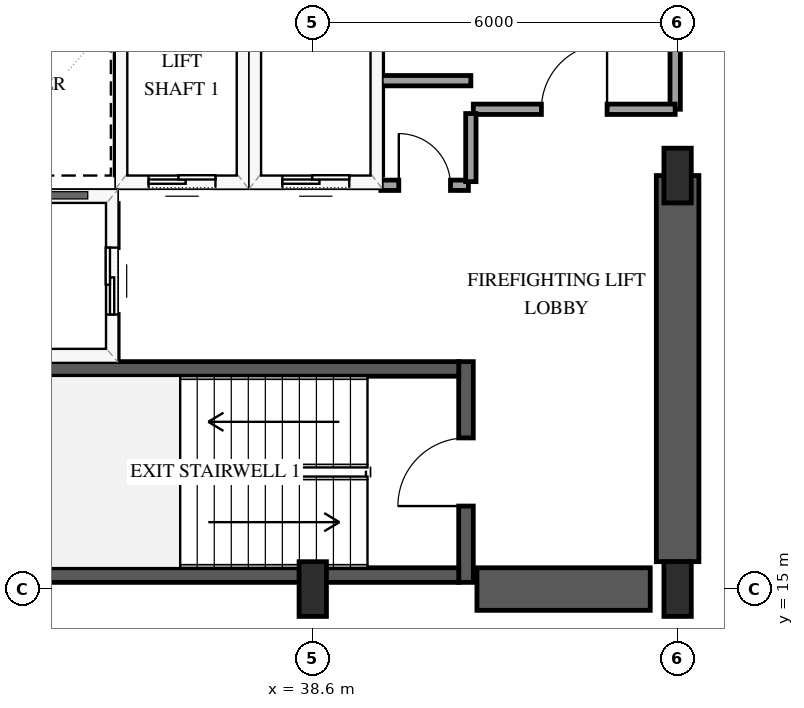
"""IFC4 building model, lengths in metres.
Left out: names, types, materials, properties, quantities, classifications, styles, units other than length and angle.
Written with IfcOpenShell. Run it as: python <this file> out.ifc"""

import sys

from ifc_helpers import new_model, si_unit, direction, frame, frame_2d, origin, origin_2d, place, context, subcontext, project, spatial, rectangle, extrude, element, fill, save


model = new_model("IFC4")
c1 = context("Model", 3, precision=1e-05, world=origin(), true_north=direction((0.0, 1.0)))
c2 = subcontext(c1, "Body", "Model", "MODEL_VIEW")
j1 = project(units=[si_unit("LENGTHUNIT", "METRE"), si_unit("PLANEANGLEUNIT", "RADIAN")], contexts=[c1])
p1 = place(None, origin())
s1 = spatial("IfcSite", under=j1, at=p1, CompositionType="ELEMENT")
p2 = place(p1, origin())
s2 = spatial("IfcBuilding", under=s1, at=p2, CompositionType="ELEMENT")
p3 = place(p2, frame((0.0, 0.0, 70.6)))
s3 = spatial("IfcBuildingStorey", under=s2, at=p3, CompositionType="ELEMENT", Elevation=70.6)
p4 = place(p3, frame((41.12, 15.11, 0.0), z_axis=(0.0, 0.0, 1.0), x_axis=(0.0, 1.0, 0.0)))
e1 = element("IfcWall", 1, at=p4, inside=s3, PredefinedType="SHEAR", context=c2, shape_type="SweptSolid", body=[
    extrude(rectangle(XDim=3.63, YDim=0.24, at=frame_2d((1.815, 0.0))), origin(), (0.0, 0.0, 1.0), 4.0),
])
p5 = place(p4, frame((1.255, 0.0, 0.0)))
e2 = element("IfcOpeningElement", 2, at=p5, cuts=e1, PredefinedType="OPENING", context=c2, shape_type="SweptSolid", body=[
    extrude(rectangle(XDim=1.12, YDim=2.15, at=frame_2d((0.56, 1.075))), frame((0.0, 0.13, 0.0), z_axis=(0.0, -1.0, 0.0), x_axis=(1.0, 0.0, 0.0)), (0.0, 0.0, 1.0), 0.26),
])
for number, where, z_axis, x_axis in (
    (3, (33.0, 15.23, 0.0), (0.0, 0.0, 1.0), (1.0, 0.0, 0.0)),
    (4, (33.0, 18.62, 0.0), (0.0, 0.0, 1.0), (1.0, 0.0, 0.0)),
):
    element("IfcWall", number, at=place(p3, frame(where, z_axis=z_axis, x_axis=x_axis)), inside=s3, PredefinedType="SHEAR", context=c2, shape_type="SweptSolid", body=[
        extrude(rectangle(XDim=8.0, YDim=0.24, at=frame_2d((4.0, 0.0))), origin(), (0.0, 0.0, 1.0), 4.0),
    ])
p6 = place(p3, frame((41.3, 15.0, 0.0), z_axis=(0.0, 0.0, 1.0), x_axis=(1.0, 0.0, 0.0)))
e5 = element("IfcWall", 5, at=p6, inside=s3, PredefinedType="SHEAR", context=c2, shape_type="SweptSolid", body=[
    extrude(rectangle(XDim=2.85, YDim=0.7, at=frame_2d((1.425, 0.0))), origin(), (0.0, 0.0, 1.0), 4.0),
])
p7 = place(p3, frame((44.6, 15.45, 0.0), z_axis=(0.0, 0.0, 1.0), x_axis=(0.0, 1.0, 0.0)))
e6 = element("IfcWall", 6, at=p7, inside=s3, PredefinedType="SHEAR", context=c2, shape_type="SweptSolid", body=[
    extrude(rectangle(XDim=6.35, YDim=0.7, at=frame_2d((3.175, 0.0))), origin(), (0.0, 0.0, 1.0), 4.0),
])
for number, where, z_axis, x_axis in (
    (7, (38.6, 15.0, 0.0), (0.0, 0.0, 1.0), (1.0, 0.0, 0.0)),
    (8, (44.6, 15.0, 0.0), (0.0, 0.0, 1.0), (1.0, 0.0, 0.0)),
    (9, (44.6, 21.8, 0.0), (0.0, 0.0, 1.0), (1.0, 0.0, 0.0)),
):
    element("IfcColumn", number, at=place(p3, frame(where, z_axis=z_axis, x_axis=x_axis)), inside=s3, PredefinedType="PILASTER", context=c2, shape_type="SweptSolid", body=[
        extrude(rectangle(XDim=0.45, YDim=0.9, at=origin_2d()), origin(), (0.0, 0.0, 1.0), 4.0),
    ])
p8 = place(p3, frame((35.45, 21.7, 0.0), z_axis=(0.0, 0.0, 1.0), x_axis=(1.0, 0.0, 0.0)))
e10 = element("IfcWall", 10, at=p8, inside=s3, PredefinedType="SOLIDWALL", context=c2, shape_type="SweptSolid", body=[
    extrude(rectangle(XDim=2.0, YDim=0.2, at=frame_2d((1.0, 0.0))), origin(), (0.0, 0.0, 1.0), 3.7),
])
p9 = place(p8, frame((0.45, 0.0, 0.0)))
e11 = element("IfcOpeningElement", 11, at=p9, cuts=e10, PredefinedType="OPENING", context=c2, shape_type="SweptSolid", body=[
    extrude(rectangle(XDim=1.1, YDim=2.15, at=frame_2d((0.55, 1.075))), frame((0.0, 0.11, 0.0), z_axis=(0.0, -1.0, 0.0), x_axis=(1.0, 0.0, 0.0)), (0.0, 0.0, 1.0), 0.22),
])
for number, where, z_axis, x_axis in (
    (12, (35.45, 21.81, 0.0), (0.0, 0.0, 1.0), (0.0, 1.0, 0.0)),
    (13, (37.45, 21.81, 0.0), (0.0, 0.0, 1.0), (0.0, 1.0, 0.0)),
):
    element("IfcWall", number, at=place(p3, frame(where, z_axis=z_axis, x_axis=x_axis)), inside=s3, PredefinedType="SOLIDWALL", context=c2, shape_type="SweptSolid", body=[
        extrude(rectangle(XDim=2.38, YDim=0.2, at=frame_2d((1.19, 0.0))), origin(), (0.0, 0.0, 1.0), 3.7),
    ])
p10 = place(p3, frame((37.65, 21.7, 0.0), z_axis=(0.0, 0.0, 1.0), x_axis=(1.0, 0.0, 0.0)))
e14 = element("IfcWall", 14, at=p10, inside=s3, PredefinedType="SOLIDWALL", context=c2, shape_type="SweptSolid", body=[
    extrude(rectangle(XDim=2.0, YDim=0.2, at=frame_2d((1.0, 0.0))), origin(), (0.0, 0.0, 1.0), 3.7),
])
p11 = place(p10, frame((0.45, 0.0, 0.0)))
e15 = element("IfcOpeningElement", 15, at=p11, cuts=e14, PredefinedType="OPENING", context=c2, shape_type="SweptSolid", body=[
    extrude(rectangle(XDim=1.1, YDim=2.15, at=frame_2d((0.55, 1.075))), frame((0.0, 0.11, 0.0), z_axis=(0.0, -1.0, 0.0), x_axis=(1.0, 0.0, 0.0)), (0.0, 0.0, 1.0), 0.22),
])
p12 = place(p3, frame((39.65, 21.81, 0.0), z_axis=(0.0, 0.0, 1.0), x_axis=(0.0, 1.0, 0.0)))
e16 = element("IfcWall", 16, at=p12, inside=s3, PredefinedType="SOLIDWALL", context=c2, shape_type="SweptSolid", body=[
    extrude(rectangle(XDim=2.38, YDim=0.2, at=frame_2d((1.19, 0.0))), origin(), (0.0, 0.0, 1.0), 3.7),
])
p13 = place(p3, frame((32.72, 21.45, 0.0), z_axis=(0.0, 0.0, 1.0), x_axis=(1.0, 0.0, 0.0)))
e17 = element("IfcWall", 17, at=p13, inside=s3, PredefinedType="SOLIDWALL", context=c2, shape_type="SweptSolid", body=[
    extrude(rectangle(XDim=2.58, YDim=0.2, at=frame_2d((1.29, 0.0))), origin(), (0.0, 0.0, 1.0), 3.7),
])
p14 = place(p3, frame((35.3, 18.79, 0.0), z_axis=(0.0, 0.0, 1.0), x_axis=(0.0, 1.0, 0.0)))
e18 = element("IfcWall", 18, at=p14, inside=s3, PredefinedType="SOLIDWALL", context=c2, shape_type="SweptSolid", body=[
    extrude(rectangle(XDim=2.55, YDim=0.2, at=frame_2d((1.275, 0.0))), origin(), (0.0, 0.0, 1.0), 3.7),
])
p15 = place(p14, frame((0.725, 0.0, 0.0)))
e19 = element("IfcOpeningElement", 19, at=p15, cuts=e18, PredefinedType="OPENING", context=c2, shape_type="SweptSolid", body=[
    extrude(rectangle(XDim=1.1, YDim=2.15, at=frame_2d((0.55, 1.075))), frame((0.0, 0.11, 0.0), z_axis=(0.0, -1.0, 0.0), x_axis=(1.0, 0.0, 0.0)), (0.0, 0.0, 1.0), 0.22),
])
p16 = place(p3, frame((44.56, 29.8, 0.0), z_axis=(0.0, 0.0, 1.0), x_axis=(0.0, -1.0, 0.0)))
e20 = element("IfcWall", 20, at=p16, inside=s3, PredefinedType="PARTITIONING", context=c2, shape_type="SweptSolid", body=[
    extrude(rectangle(XDim=6.91, YDim=0.17, at=frame_2d((3.455, 0.0))), origin(), (0.0, 0.0, 1.0), 2.74),
])
p17 = place(p16, frame((2.915, 0.0, 0.0)))
e21 = element("IfcOpeningElement", 21, at=p17, cuts=e20, PredefinedType="OPENING", context=c2, shape_type="SweptSolid", body=[
    extrude(rectangle(XDim=1.08, YDim=2.15, at=frame_2d((0.54, 1.075))), frame((0.0, 0.095, 0.0), z_axis=(0.0, -1.0, 0.0), x_axis=(1.0, 0.0, 0.0)), (0.0, 0.0, 1.0), 0.19),
])
p18 = place(p3, frame((41.24, 22.89, 0.0), z_axis=(0.0, 0.0, 1.0), x_axis=(1.0, 0.0, 0.0)))
e22 = element("IfcWall", 22, at=p18, inside=s3, PredefinedType="PARTITIONING", context=c2, shape_type="SweptSolid", body=[
    extrude(rectangle(XDim=3.32, YDim=0.17, at=frame_2d((1.66, 0.0))), origin(), (0.0, 0.0, 1.0), 3.7),
])
p19 = place(p18, frame((1.12, 0.0, 0.0)))
e23 = element("IfcOpeningElement", 23, at=p19, cuts=e22, PredefinedType="OPENING", context=c2, shape_type="SweptSolid", body=[
    extrude(rectangle(XDim=1.08, YDim=2.15, at=frame_2d((0.54, 1.075))), frame((0.0, 0.095, 0.0), z_axis=(0.0, -1.0, 0.0), x_axis=(1.0, 0.0, 0.0)), (0.0, 0.0, 1.0), 0.19),
])
p20 = place(p3, frame((39.72, 21.64, 0.0), z_axis=(0.0, 0.0, 1.0), x_axis=(1.0, 0.0, 0.0)))
e24 = element("IfcWall", 24, at=p20, inside=s3, PredefinedType="PARTITIONING", context=c2, shape_type="SweptSolid", body=[
    extrude(rectangle(XDim=1.44, YDim=0.17, at=frame_2d((0.72, 0.0))), origin(), (0.0, 0.0, 1.0), 3.7),
])
p21 = place(p20, frame((0.295, 0.0, 0.0)))
e25 = element("IfcOpeningElement", 25, at=p21, cuts=e24, PredefinedType="OPENING", context=c2, shape_type="SweptSolid", body=[
    extrude(rectangle(XDim=0.85, YDim=2.1, at=frame_2d((0.425, 1.05))), frame((0.0, 0.095, 0.0), z_axis=(0.0, -1.0, 0.0), x_axis=(1.0, 0.0, 0.0)), (0.0, 0.0, 1.0), 0.19),
])
p22 = place(p3, frame((41.2, 21.7, 0.0), z_axis=(0.0, 0.0, 1.0), x_axis=(0.0, 1.0, 0.0)))
e26 = element("IfcWall", 26, at=p22, inside=s3, PredefinedType="PARTITIONING", context=c2, shape_type="SweptSolid", body=[
    extrude(rectangle(XDim=1.12, YDim=0.17, at=frame_2d((0.56, 0.0))), origin(), (0.0, 0.0, 1.0), 3.7),
])
p23 = place(p3, frame((41.2, 23.36, 0.0), z_axis=(0.0, 0.0, 1.0), x_axis=(-1.0, 0.0, 0.0)))
e27 = element("IfcWall", 27, at=p23, inside=s3, PredefinedType="PARTITIONING", context=c2, shape_type="SweptSolid", body=[
    extrude(rectangle(XDim=1.48, YDim=0.17, at=frame_2d((0.74, 0.0))), origin(), (0.0, 0.0, 1.0), 3.7),
])
p24 = place(p9, origin())
e28 = element("IfcDoor", 28, at=p24, inside=s3, OperationType="SLIDING_TO_LEFT", PredefinedType="DOOR", context=c2, shape_type="SweptSolid", body=[
    extrude(rectangle(XDim=1.1, YDim=2.15, at=frame_2d((0.55, 1.075))), frame((0.0, 0.025, 0.0), z_axis=(0.0, -1.0, 0.0), x_axis=(1.0, 0.0, 0.0)), (0.0, 0.0, 1.0), 0.05),
])
fill(e11, e28)
p25 = place(p11, origin())
e29 = element("IfcDoor", 29, at=p25, inside=s3, OperationType="SLIDING_TO_LEFT", PredefinedType="DOOR", context=c2, shape_type="SweptSolid", body=[
    extrude(rectangle(XDim=1.1, YDim=2.15, at=frame_2d((0.55, 1.075))), frame((0.0, 0.025, 0.0), z_axis=(0.0, -1.0, 0.0), x_axis=(1.0, 0.0, 0.0)), (0.0, 0.0, 1.0), 0.05),
])
fill(e15, e29)
p26 = place(p15, origin())
e30 = element("IfcDoor", 30, at=p26, inside=s3, OperationType="SLIDING_TO_LEFT", PredefinedType="DOOR", context=c2, shape_type="SweptSolid", body=[
    extrude(rectangle(XDim=1.1, YDim=2.15, at=frame_2d((0.55, 1.075))), frame((0.0, 0.025, 0.0), z_axis=(0.0, -1.0, 0.0), x_axis=(1.0, 0.0, 0.0)), (0.0, 0.0, 1.0), 0.05),
])
fill(e19, e30)
p27 = place(p5, origin())
e31 = element("IfcDoor", 31, at=p27, inside=s3, OperationType="SINGLE_SWING_LEFT", PredefinedType="DOOR", context=c2, shape_type="SweptSolid", body=[
    extrude(rectangle(XDim=1.12, YDim=2.15, at=frame_2d((0.56, 1.075))), frame((0.0, 0.025, 0.0), z_axis=(0.0, -1.0, 0.0), x_axis=(1.0, 0.0, 0.0)), (0.0, 0.0, 1.0), 0.05),
])
fill(e2, e31)
p28 = place(p19, origin())
e32 = element("IfcDoor", 32, at=p28, inside=s3, OperationType="SINGLE_SWING_RIGHT", PredefinedType="DOOR", context=c2, shape_type="SweptSolid", body=[
    extrude(rectangle(XDim=1.08, YDim=2.15, at=frame_2d((0.54, 1.075))), frame((0.0, 0.025, 0.0), z_axis=(0.0, -1.0, 0.0), x_axis=(1.0, 0.0, 0.0)), (0.0, 0.0, 1.0), 0.05),
])
fill(e23, e32)
p29 = place(p21, origin())
e33 = element("IfcDoor", 33, at=p29, inside=s3, OperationType="SINGLE_SWING_LEFT", PredefinedType="DOOR", context=c2, shape_type="SweptSolid", body=[
    extrude(rectangle(XDim=0.85, YDim=2.1, at=frame_2d((0.425, 1.05))), frame((0.0, 0.025, 0.0), z_axis=(0.0, -1.0, 0.0), x_axis=(1.0, 0.0, 0.0)), (0.0, 0.0, 1.0), 0.05),
])
fill(e25, e33)
save(model, sys.argv[1])
